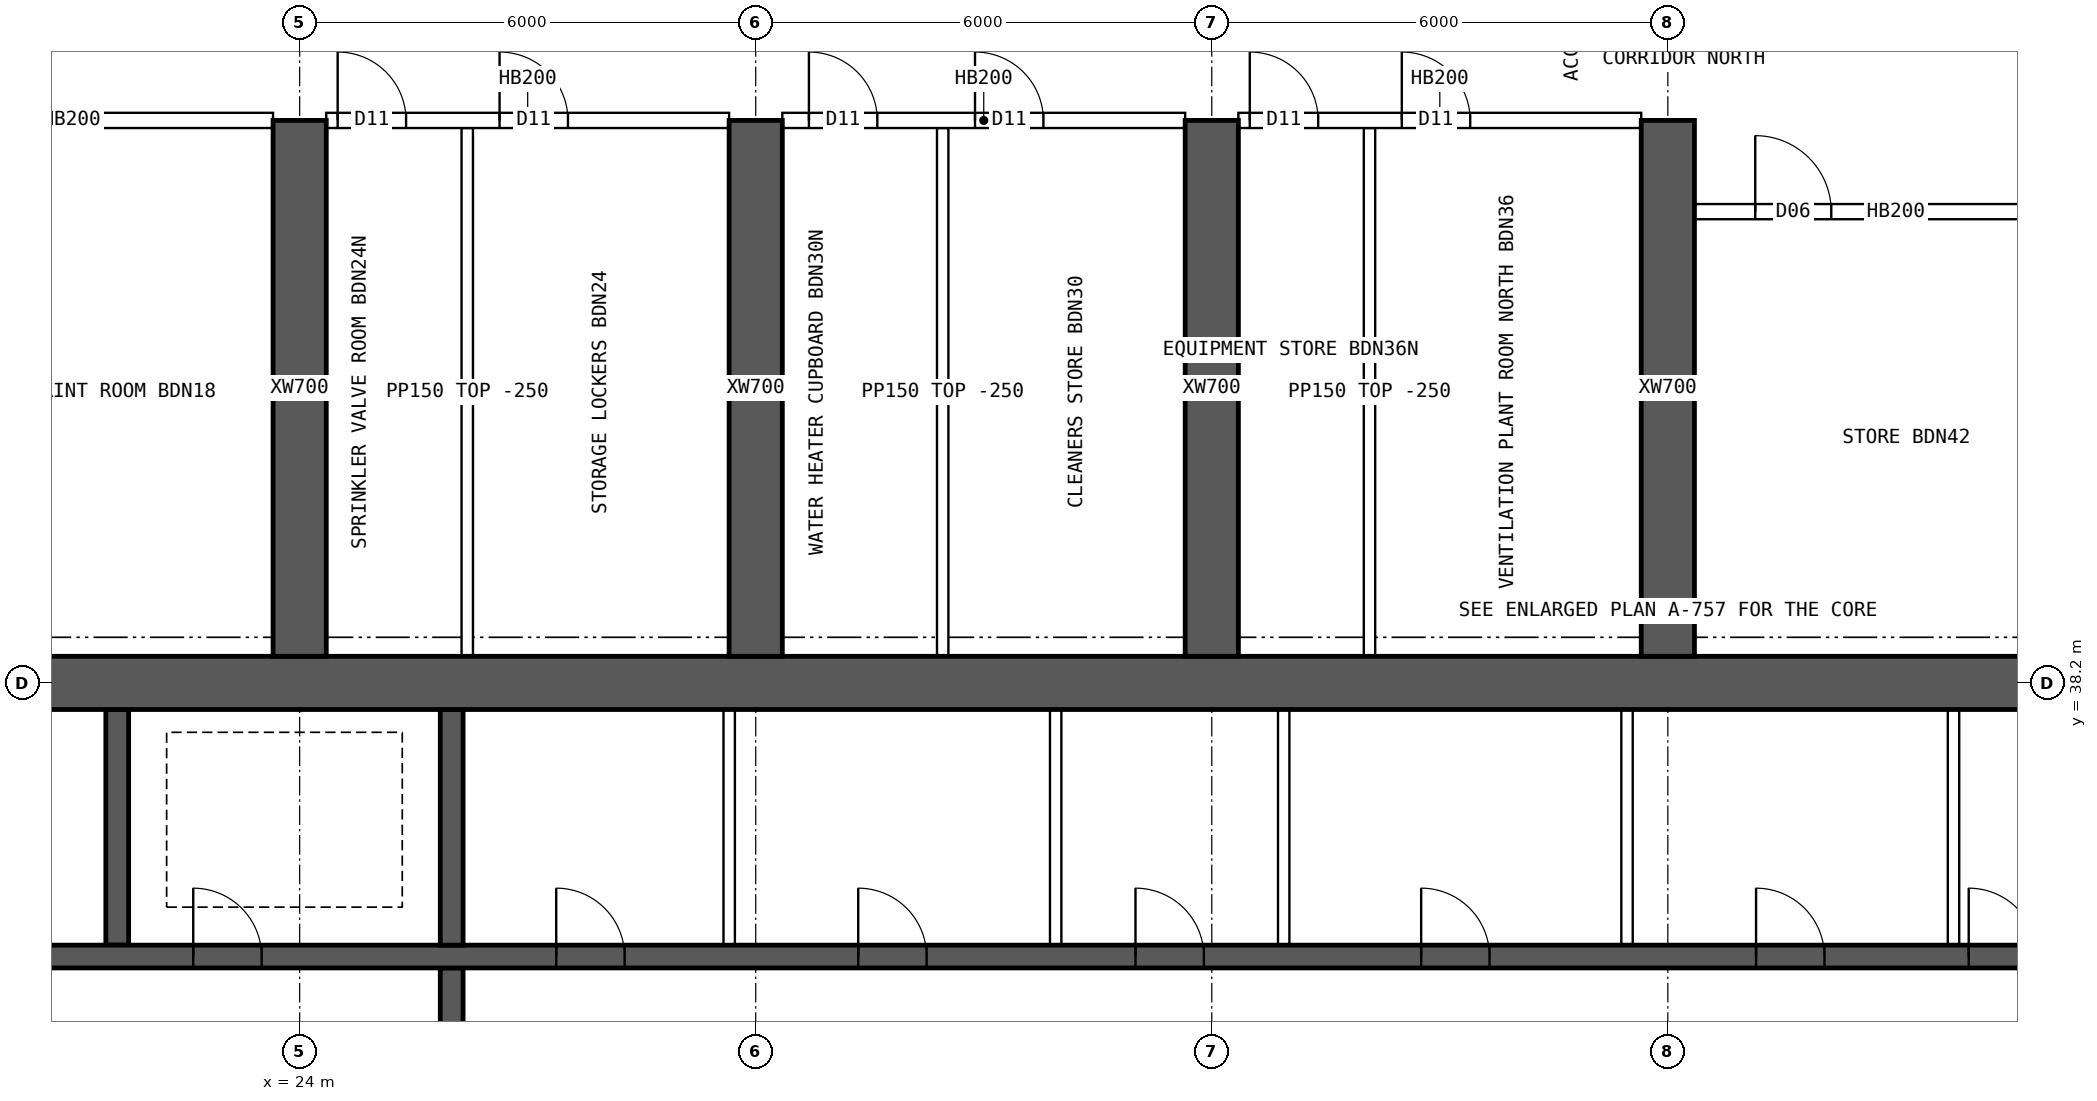
"""IFC4 building model, lengths in metres.
Left out: names, types, materials, properties, quantities, classifications, styles, units other than length and angle.
Written with IfcOpenShell. Run it as: python <this file> out.ifc"""

import sys

from ifc_helpers import new_model, si_unit, direction, frame, frame_2d, origin, place, context, subcontext, project, spatial, rectangle, extrude, element, fill, save


model = new_model("IFC4")
c1 = context("Model", 3, precision=1e-05, world=origin(), true_north=direction((0.0, 1.0)))
c2 = subcontext(c1, "Body", "Model", "MODEL_VIEW")
j1 = project(units=[si_unit("LENGTHUNIT", "METRE"), si_unit("PLANEANGLEUNIT", "RADIAN")], contexts=[c1])
p1 = place(None, origin())
s1 = spatial("IfcSite", under=j1, at=p1, CompositionType="ELEMENT")
p2 = place(p1, origin())
s2 = spatial("IfcBuilding", under=s1, at=p2, CompositionType="ELEMENT")
p3 = place(p2, frame((0.0, 0.0, 220.3)))
s3 = spatial("IfcBuildingStorey", under=s2, at=p3, CompositionType="ELEMENT", Elevation=220.3)
p4 = place(p3, frame((18.0, 38.2, 0.0), z_axis=(0.0, 0.0, 1.0), x_axis=(1.0, 0.0, 0.0)))
e1 = element("IfcWall", 1, at=p4, inside=s3, PredefinedType="SHEAR", context=c2, shape_type="SweptSolid", body=[
    extrude(rectangle(XDim=48.0, YDim=0.7, at=frame_2d((24.0, 0.0))), origin(), (0.0, 0.0, 1.0), 3.75),
])
p5 = place(p3, frame((18.35, 34.6, 0.0), z_axis=(0.0, 0.0, 1.0), x_axis=(1.0, 0.0, 0.0)))
e2 = element("IfcWall", 2, at=p5, inside=s3, PredefinedType="SHEAR", context=c2, shape_type="SweptSolid", body=[
    extrude(rectangle(XDim=47.3, YDim=0.3, at=frame_2d((23.65, 0.0))), origin(), (0.0, 0.0, 1.0), 3.75),
])
p6 = place(p5, frame((0.9, 0.0, 0.0)))
e3 = element("IfcOpeningElement", 3, at=p6, cuts=e2, PredefinedType="OPENING", context=c2, shape_type="SweptSolid", body=[
    extrude(rectangle(XDim=1.1, YDim=2.1, at=frame_2d((0.55, 1.05))), frame((0.0, 0.16, 0.0), z_axis=(0.0, -1.0, 0.0), x_axis=(1.0, 0.0, 0.0)), (0.0, 0.0, 1.0), 0.32),
])
p7 = place(p5, frame((45.3, 0.0, 0.0)))
e4 = element("IfcOpeningElement", 4, at=p7, cuts=e2, PredefinedType="OPENING", context=c2, shape_type="SweptSolid", body=[
    extrude(rectangle(XDim=1.1, YDim=2.1, at=frame_2d((0.55, 1.05))), frame((0.0, 0.16, 0.0), z_axis=(0.0, -1.0, 0.0), x_axis=(1.0, 0.0, 0.0)), (0.0, 0.0, 1.0), 0.32),
])
p8 = place(p5, frame((4.25, 0.0, 0.0)))
e5 = element("IfcOpeningElement", 5, at=p8, cuts=e2, PredefinedType="OPENING", context=c2, shape_type="SweptSolid", body=[
    extrude(rectangle(XDim=0.9, YDim=2.1, at=frame_2d((0.45, 1.05))), frame((0.0, 0.16, 0.0), z_axis=(0.0, -1.0, 0.0), x_axis=(1.0, 0.0, 0.0)), (0.0, 0.0, 1.0), 0.32),
])
p9 = place(p5, frame((42.15, 0.0, 0.0)))
e6 = element("IfcOpeningElement", 6, at=p9, cuts=e2, PredefinedType="OPENING", context=c2, shape_type="SweptSolid", body=[
    extrude(rectangle(XDim=0.9, YDim=2.1, at=frame_2d((0.45, 1.05))), frame((0.0, 0.16, 0.0), z_axis=(0.0, -1.0, 0.0), x_axis=(1.0, 0.0, 0.0)), (0.0, 0.0, 1.0), 0.32),
])
p10 = place(p5, frame((9.025, 0.0, 0.0)))
e7 = element("IfcOpeningElement", 7, at=p10, cuts=e2, PredefinedType="OPENING", context=c2, shape_type="SweptSolid", body=[
    extrude(rectangle(XDim=0.9, YDim=2.1, at=frame_2d((0.45, 1.05))), frame((0.0, 0.16, 0.0), z_axis=(0.0, -1.0, 0.0), x_axis=(1.0, 0.0, 0.0)), (0.0, 0.0, 1.0), 0.32),
])
p11 = place(p5, frame((12.999, 0.0, 0.0)))
e8 = element("IfcOpeningElement", 8, at=p11, cuts=e2, PredefinedType="OPENING", context=c2, shape_type="SweptSolid", body=[
    extrude(rectangle(XDim=0.9, YDim=2.1, at=frame_2d((0.45, 1.05))), frame((0.0, 0.16, 0.0), z_axis=(0.0, -1.0, 0.0), x_axis=(1.0, 0.0, 0.0)), (0.0, 0.0, 1.0), 0.32),
])
p12 = place(p5, frame((16.646, 0.0, 0.0)))
e9 = element("IfcOpeningElement", 9, at=p12, cuts=e2, PredefinedType="OPENING", context=c2, shape_type="SweptSolid", body=[
    extrude(rectangle(XDim=0.9, YDim=2.1, at=frame_2d((0.45, 1.05))), frame((0.0, 0.16, 0.0), z_axis=(0.0, -1.0, 0.0), x_axis=(1.0, 0.0, 0.0)), (0.0, 0.0, 1.0), 0.32),
])
p13 = place(p5, frame((20.405, 0.0, 0.0)))
e10 = element("IfcOpeningElement", 10, at=p13, cuts=e2, PredefinedType="OPENING", context=c2, shape_type="SweptSolid", body=[
    extrude(rectangle(XDim=0.9, YDim=2.1, at=frame_2d((0.45, 1.05))), frame((0.0, 0.16, 0.0), z_axis=(0.0, -1.0, 0.0), x_axis=(1.0, 0.0, 0.0)), (0.0, 0.0, 1.0), 0.32),
])
p14 = place(p5, frame((24.811, 0.0, 0.0)))
e11 = element("IfcOpeningElement", 11, at=p14, cuts=e2, PredefinedType="OPENING", context=c2, shape_type="SweptSolid", body=[
    extrude(rectangle(XDim=0.9, YDim=2.1, at=frame_2d((0.45, 1.05))), frame((0.0, 0.16, 0.0), z_axis=(0.0, -1.0, 0.0), x_axis=(1.0, 0.0, 0.0)), (0.0, 0.0, 1.0), 0.32),
])
p15 = place(p5, frame((27.608, 0.0, 0.0)))
e12 = element("IfcOpeningElement", 12, at=p15, cuts=e2, PredefinedType="OPENING", context=c2, shape_type="SweptSolid", body=[
    extrude(rectangle(XDim=0.9, YDim=2.1, at=frame_2d((0.45, 1.05))), frame((0.0, 0.16, 0.0), z_axis=(0.0, -1.0, 0.0), x_axis=(1.0, 0.0, 0.0)), (0.0, 0.0, 1.0), 0.32),
])
p16 = place(p5, frame((29.575, 0.0, 0.0)))
e13 = element("IfcOpeningElement", 13, at=p16, cuts=e2, PredefinedType="OPENING", context=c2, shape_type="SweptSolid", body=[
    extrude(rectangle(XDim=0.9, YDim=2.1, at=frame_2d((0.45, 1.05))), frame((0.0, 0.16, 0.0), z_axis=(0.0, -1.0, 0.0), x_axis=(1.0, 0.0, 0.0)), (0.0, 0.0, 1.0), 0.32),
])
p17 = place(p5, frame((32.007, 0.0, 0.0)))
e14 = element("IfcOpeningElement", 14, at=p17, cuts=e2, PredefinedType="OPENING", context=c2, shape_type="SweptSolid", body=[
    extrude(rectangle(XDim=0.9, YDim=2.1, at=frame_2d((0.45, 1.05))), frame((0.0, 0.16, 0.0), z_axis=(0.0, -1.0, 0.0), x_axis=(1.0, 0.0, 0.0)), (0.0, 0.0, 1.0), 0.32),
])
p18 = place(p5, frame((34.742, 0.0, 0.0)))
e15 = element("IfcOpeningElement", 15, at=p18, cuts=e2, PredefinedType="OPENING", context=c2, shape_type="SweptSolid", body=[
    extrude(rectangle(XDim=0.9, YDim=2.1, at=frame_2d((0.45, 1.05))), frame((0.0, 0.16, 0.0), z_axis=(0.0, -1.0, 0.0), x_axis=(1.0, 0.0, 0.0)), (0.0, 0.0, 1.0), 0.32),
])
p19 = place(p5, frame((37.781, 0.0, 0.0)))
e16 = element("IfcOpeningElement", 16, at=p19, cuts=e2, PredefinedType="OPENING", context=c2, shape_type="SweptSolid", body=[
    extrude(rectangle(XDim=0.9, YDim=2.1, at=frame_2d((0.45, 1.05))), frame((0.0, 0.16, 0.0), z_axis=(0.0, -1.0, 0.0), x_axis=(1.0, 0.0, 0.0)), (0.0, 0.0, 1.0), 0.32),
])
p20 = place(p3, frame((26.0, 30.55, 0.0), z_axis=(0.0, 0.0, 1.0), x_axis=(0.0, 1.0, 0.0)))
e17 = element("IfcWall", 17, at=p20, inside=s3, PredefinedType="SHEAR", context=c2, shape_type="SweptSolid", body=[
    extrude(rectangle(XDim=3.9, YDim=0.3, at=frame_2d((1.95, 0.0))), origin(), (0.0, 0.0, 1.0), 3.75),
])
p21 = place(p20, frame((1.4, 0.0, 0.0)))
e18 = element("IfcOpeningElement", 18, at=p21, cuts=e17, PredefinedType="OPENING", context=c2, shape_type="SweptSolid", body=[
    extrude(rectangle(XDim=1.2, YDim=2.1, at=frame_2d((0.6, 1.05))), frame((0.0, 0.16, 0.0), z_axis=(0.0, -1.0, 0.0), x_axis=(1.0, 0.0, 0.0)), (0.0, 0.0, 1.0), 0.32),
])
for number, where, z_axis, x_axis in (
    (19, (21.6, 34.75, 0.0), (0.0, 0.0, 1.0), (0.0, 1.0, 0.0)),
    (20, (26.0, 34.75, 0.0), (0.0, 0.0, 1.0), (0.0, 1.0, 0.0)),
):
    element("IfcWall", number, at=place(p3, frame(where, z_axis=z_axis, x_axis=x_axis)), inside=s3, PredefinedType="SHEAR", context=c2, shape_type="SweptSolid", body=[
        extrude(rectangle(XDim=3.1, YDim=0.3, at=frame_2d((1.55, 0.0))), origin(), (0.0, 0.0, 1.0), 3.75),
    ])
for number, where, z_axis, x_axis in (
    (21, (24.0, 38.55, 0.0), (0.0, 0.0, 1.0), (0.0, 1.0, 0.0)),
    (22, (30.0, 38.55, 0.0), (0.0, 0.0, 1.0), (0.0, 1.0, 0.0)),
    (23, (36.0, 38.55, 0.0), (0.0, 0.0, 1.0), (0.0, 1.0, 0.0)),
    (24, (42.0, 38.55, 0.0), (0.0, 0.0, 1.0), (0.0, 1.0, 0.0)),
):
    element("IfcWall", number, at=place(p3, frame(where, z_axis=z_axis, x_axis=x_axis)), inside=s3, PredefinedType="SHEAR", context=c2, shape_type="SweptSolid", body=[
        extrude(rectangle(XDim=7.05, YDim=0.7, at=frame_2d((3.525, 0.0))), origin(), (0.0, 0.0, 1.0), 3.75),
    ])
for number, where, z_axis, x_axis in (
    (25, (29.651, 34.75, 0.0), (0.0, 0.0, 1.0), (0.0, 1.0, 0.0)),
    (26, (33.946, 34.75, 0.0), (0.0, 0.0, 1.0), (0.0, 1.0, 0.0)),
    (27, (36.946, 34.75, 0.0), (0.0, 0.0, 1.0), (0.0, 1.0, 0.0)),
    (28, (41.463, 34.75, 0.0), (0.0, 0.0, 1.0), (0.0, 1.0, 0.0)),
    (29, (45.758, 34.75, 0.0), (0.0, 0.0, 1.0), (0.0, 1.0, 0.0)),
):
    element("IfcWall", number, at=place(p3, frame(where, z_axis=z_axis, x_axis=x_axis)), inside=s3, PredefinedType="SOLIDWALL", context=c2, shape_type="SweptSolid", body=[
        extrude(rectangle(XDim=3.1, YDim=0.15, at=frame_2d((1.55, 0.0))), origin(), (0.0, 0.0, 1.0), 3.5),
    ])
p22 = place(p3, frame((18.35, 45.6, 0.0), z_axis=(0.0, 0.0, 1.0), x_axis=(1.0, 0.0, 0.0)))
e30 = element("IfcWall", 30, at=p22, inside=s3, PredefinedType="SOLIDWALL", context=c2, shape_type="SweptSolid", body=[
    extrude(rectangle(XDim=5.3, YDim=0.2, at=frame_2d((2.65, 0.0))), origin(), (0.0, 0.0, 1.0), 3.5),
])
p23 = place(p22, frame((0.8, 0.0, 0.0)))
e31 = element("IfcOpeningElement", 31, at=p23, cuts=e30, PredefinedType="OPENING", context=c2, shape_type="SweptSolid", body=[
    extrude(rectangle(XDim=1.0, YDim=2.1, at=frame_2d((0.5, 1.05))), frame((0.0, 0.11, 0.0), z_axis=(0.0, -1.0, 0.0), x_axis=(1.0, 0.0, 0.0)), (0.0, 0.0, 1.0), 0.22),
])
p24 = place(p3, frame((24.35, 45.6, 0.0), z_axis=(0.0, 0.0, 1.0), x_axis=(1.0, 0.0, 0.0)))
e32 = element("IfcWall", 32, at=p24, inside=s3, PredefinedType="SOLIDWALL", context=c2, shape_type="SweptSolid", body=[
    extrude(rectangle(XDim=5.3, YDim=0.2, at=frame_2d((2.65, 0.0))), origin(), (0.0, 0.0, 1.0), 3.5),
])
p25 = place(p24, frame((0.15, 0.0, 0.0)))
e33 = element("IfcOpeningElement", 33, at=p25, cuts=e32, PredefinedType="OPENING", context=c2, shape_type="SweptSolid", body=[
    extrude(rectangle(XDim=0.9, YDim=2.1, at=frame_2d((0.45, 1.05))), frame((0.0, 0.11, 0.0), z_axis=(0.0, -1.0, 0.0), x_axis=(1.0, 0.0, 0.0)), (0.0, 0.0, 1.0), 0.22),
])
p26 = place(p24, frame((2.28, 0.0, 0.0)))
e34 = element("IfcOpeningElement", 34, at=p26, cuts=e32, PredefinedType="OPENING", context=c2, shape_type="SweptSolid", body=[
    extrude(rectangle(XDim=0.9, YDim=2.1, at=frame_2d((0.45, 1.05))), frame((0.0, 0.11, 0.0), z_axis=(0.0, -1.0, 0.0), x_axis=(1.0, 0.0, 0.0)), (0.0, 0.0, 1.0), 0.22),
])
p27 = place(p3, frame((30.35, 45.6, 0.0), z_axis=(0.0, 0.0, 1.0), x_axis=(1.0, 0.0, 0.0)))
e35 = element("IfcWall", 35, at=p27, inside=s3, PredefinedType="SOLIDWALL", context=c2, shape_type="SweptSolid", body=[
    extrude(rectangle(XDim=5.3, YDim=0.2, at=frame_2d((2.65, 0.0))), origin(), (0.0, 0.0, 1.0), 3.5),
])
p28 = place(p27, frame((0.35, 0.0, 0.0)))
e36 = element("IfcOpeningElement", 36, at=p28, cuts=e35, PredefinedType="OPENING", context=c2, shape_type="SweptSolid", body=[
    extrude(rectangle(XDim=0.9, YDim=2.1, at=frame_2d((0.45, 1.05))), frame((0.0, 0.11, 0.0), z_axis=(0.0, -1.0, 0.0), x_axis=(1.0, 0.0, 0.0)), (0.0, 0.0, 1.0), 0.22),
])
p29 = place(p27, frame((2.535, 0.0, 0.0)))
e37 = element("IfcOpeningElement", 37, at=p29, cuts=e35, PredefinedType="OPENING", context=c2, shape_type="SweptSolid", body=[
    extrude(rectangle(XDim=0.9, YDim=2.1, at=frame_2d((0.45, 1.05))), frame((0.0, 0.11, 0.0), z_axis=(0.0, -1.0, 0.0), x_axis=(1.0, 0.0, 0.0)), (0.0, 0.0, 1.0), 0.22),
])
p30 = place(p3, frame((36.35, 45.6, 0.0), z_axis=(0.0, 0.0, 1.0), x_axis=(1.0, 0.0, 0.0)))
e38 = element("IfcWall", 38, at=p30, inside=s3, PredefinedType="SOLIDWALL", context=c2, shape_type="SweptSolid", body=[
    extrude(rectangle(XDim=5.3, YDim=0.2, at=frame_2d((2.65, 0.0))), origin(), (0.0, 0.0, 1.0), 3.5),
])
p31 = place(p30, frame((0.15, 0.0, 0.0)))
e39 = element("IfcOpeningElement", 39, at=p31, cuts=e38, PredefinedType="OPENING", context=c2, shape_type="SweptSolid", body=[
    extrude(rectangle(XDim=0.9, YDim=2.1, at=frame_2d((0.45, 1.05))), frame((0.0, 0.11, 0.0), z_axis=(0.0, -1.0, 0.0), x_axis=(1.0, 0.0, 0.0)), (0.0, 0.0, 1.0), 0.22),
])
p32 = place(p30, frame((2.15, 0.0, 0.0)))
e40 = element("IfcOpeningElement", 40, at=p32, cuts=e38, PredefinedType="OPENING", context=c2, shape_type="SweptSolid", body=[
    extrude(rectangle(XDim=0.9, YDim=2.1, at=frame_2d((0.45, 1.05))), frame((0.0, 0.11, 0.0), z_axis=(0.0, -1.0, 0.0), x_axis=(1.0, 0.0, 0.0)), (0.0, 0.0, 1.0), 0.22),
])
for number, where, z_axis, x_axis in (
    (41, (26.205, 38.55, 0.0), (0.0, 0.0, 1.0), (0.0, 1.0, 0.0)),
    (42, (32.46, 38.55, 0.0), (0.0, 0.0, 1.0), (0.0, 1.0, 0.0)),
    (43, (38.075, 38.55, 0.0), (0.0, 0.0, 1.0), (0.0, 1.0, 0.0)),
):
    element("IfcWall", number, at=place(p3, frame(where, z_axis=z_axis, x_axis=x_axis)), inside=s3, PredefinedType="PARTITIONING", context=c2, shape_type="SweptSolid", body=[
        extrude(rectangle(XDim=6.95, YDim=0.15, at=frame_2d((3.475, 0.0))), origin(), (0.0, 0.0, 1.0), 3.5),
    ])
p33 = place(p3, frame((42.35, 44.4, 0.0), z_axis=(0.0, 0.0, 1.0), x_axis=(1.0, 0.0, 0.0)))
e44 = element("IfcWall", 44, at=p33, inside=s3, PredefinedType="SOLIDWALL", context=c2, shape_type="SweptSolid", body=[
    extrude(rectangle(XDim=5.3, YDim=0.2, at=frame_2d((2.65, 0.0))), origin(), (0.0, 0.0, 1.0), 3.5),
])
p34 = place(p33, frame((0.8, 0.0, 0.0)))
e45 = element("IfcOpeningElement", 45, at=p34, cuts=e44, PredefinedType="OPENING", context=c2, shape_type="SweptSolid", body=[
    extrude(rectangle(XDim=1.0, YDim=2.1, at=frame_2d((0.5, 1.05))), frame((0.0, 0.11, 0.0), z_axis=(0.0, -1.0, 0.0), x_axis=(1.0, 0.0, 0.0)), (0.0, 0.0, 1.0), 0.22),
])
p35 = place(p8, origin())
e46 = element("IfcDoor", 46, at=p35, inside=s3, OperationType="SINGLE_SWING_LEFT", PredefinedType="DOOR", context=c2, shape_type="SweptSolid", body=[
    extrude(rectangle(XDim=0.9, YDim=2.1, at=frame_2d((0.45, 1.05))), frame((0.0, 0.025, 0.0), z_axis=(0.0, -1.0, 0.0), x_axis=(1.0, 0.0, 0.0)), (0.0, 0.0, 1.0), 0.05),
])
fill(e5, e46)
p36 = place(p10, origin())
e47 = element("IfcDoor", 47, at=p36, inside=s3, OperationType="SINGLE_SWING_LEFT", PredefinedType="DOOR", context=c2, shape_type="SweptSolid", body=[
    extrude(rectangle(XDim=0.9, YDim=2.1, at=frame_2d((0.45, 1.05))), frame((0.0, 0.025, 0.0), z_axis=(0.0, -1.0, 0.0), x_axis=(1.0, 0.0, 0.0)), (0.0, 0.0, 1.0), 0.05),
])
fill(e7, e47)
p37 = place(p11, origin())
e48 = element("IfcDoor", 48, at=p37, inside=s3, OperationType="SINGLE_SWING_LEFT", PredefinedType="DOOR", context=c2, shape_type="SweptSolid", body=[
    extrude(rectangle(XDim=0.9, YDim=2.1, at=frame_2d((0.45, 1.05))), frame((0.0, 0.025, 0.0), z_axis=(0.0, -1.0, 0.0), x_axis=(1.0, 0.0, 0.0)), (0.0, 0.0, 1.0), 0.05),
])
fill(e8, e48)
p38 = place(p12, origin())
e49 = element("IfcDoor", 49, at=p38, inside=s3, OperationType="SINGLE_SWING_LEFT", PredefinedType="DOOR", context=c2, shape_type="SweptSolid", body=[
    extrude(rectangle(XDim=0.9, YDim=2.1, at=frame_2d((0.45, 1.05))), frame((0.0, 0.025, 0.0), z_axis=(0.0, -1.0, 0.0), x_axis=(1.0, 0.0, 0.0)), (0.0, 0.0, 1.0), 0.05),
])
fill(e9, e49)
p39 = place(p13, origin())
e50 = element("IfcDoor", 50, at=p39, inside=s3, OperationType="SINGLE_SWING_LEFT", PredefinedType="DOOR", context=c2, shape_type="SweptSolid", body=[
    extrude(rectangle(XDim=0.9, YDim=2.1, at=frame_2d((0.45, 1.05))), frame((0.0, 0.025, 0.0), z_axis=(0.0, -1.0, 0.0), x_axis=(1.0, 0.0, 0.0)), (0.0, 0.0, 1.0), 0.05),
])
fill(e10, e50)
p40 = place(p14, origin())
e51 = element("IfcDoor", 51, at=p40, inside=s3, OperationType="SINGLE_SWING_LEFT", PredefinedType="DOOR", context=c2, shape_type="SweptSolid", body=[
    extrude(rectangle(XDim=0.9, YDim=2.1, at=frame_2d((0.45, 1.05))), frame((0.0, 0.025, 0.0), z_axis=(0.0, -1.0, 0.0), x_axis=(1.0, 0.0, 0.0)), (0.0, 0.0, 1.0), 0.05),
])
fill(e11, e51)
p41 = place(p15, origin())
e52 = element("IfcDoor", 52, at=p41, inside=s3, OperationType="SINGLE_SWING_LEFT", PredefinedType="DOOR", context=c2, shape_type="SweptSolid", body=[
    extrude(rectangle(XDim=0.9, YDim=2.1, at=frame_2d((0.45, 1.05))), frame((0.0, 0.025, 0.0), z_axis=(0.0, -1.0, 0.0), x_axis=(1.0, 0.0, 0.0)), (0.0, 0.0, 1.0), 0.05),
])
fill(e12, e52)
p42 = place(p25, origin())
e53 = element("IfcDoor", 53, at=p42, inside=s3, OperationType="SINGLE_SWING_LEFT", PredefinedType="DOOR", context=c2, shape_type="SweptSolid", body=[
    extrude(rectangle(XDim=0.9, YDim=2.1, at=frame_2d((0.45, 1.05))), frame((0.0, 0.025, 0.0), z_axis=(0.0, -1.0, 0.0), x_axis=(1.0, 0.0, 0.0)), (0.0, 0.0, 1.0), 0.05),
])
fill(e33, e53)
p43 = place(p26, origin())
e54 = element("IfcDoor", 54, at=p43, inside=s3, OperationType="SINGLE_SWING_LEFT", PredefinedType="DOOR", context=c2, shape_type="SweptSolid", body=[
    extrude(rectangle(XDim=0.9, YDim=2.1, at=frame_2d((0.45, 1.05))), frame((0.0, 0.025, 0.0), z_axis=(0.0, -1.0, 0.0), x_axis=(1.0, 0.0, 0.0)), (0.0, 0.0, 1.0), 0.05),
])
fill(e34, e54)
p44 = place(p28, origin())
e55 = element("IfcDoor", 55, at=p44, inside=s3, OperationType="SINGLE_SWING_LEFT", PredefinedType="DOOR", context=c2, shape_type="SweptSolid", body=[
    extrude(rectangle(XDim=0.9, YDim=2.1, at=frame_2d((0.45, 1.05))), frame((0.0, 0.025, 0.0), z_axis=(0.0, -1.0, 0.0), x_axis=(1.0, 0.0, 0.0)), (0.0, 0.0, 1.0), 0.05),
])
fill(e36, e55)
p45 = place(p29, origin())
e56 = element("IfcDoor", 56, at=p45, inside=s3, OperationType="SINGLE_SWING_LEFT", PredefinedType="DOOR", context=c2, shape_type="SweptSolid", body=[
    extrude(rectangle(XDim=0.9, YDim=2.1, at=frame_2d((0.45, 1.05))), frame((0.0, 0.025, 0.0), z_axis=(0.0, -1.0, 0.0), x_axis=(1.0, 0.0, 0.0)), (0.0, 0.0, 1.0), 0.05),
])
fill(e37, e56)
p46 = place(p31, origin())
e57 = element("IfcDoor", 57, at=p46, inside=s3, OperationType="SINGLE_SWING_LEFT", PredefinedType="DOOR", context=c2, shape_type="SweptSolid", body=[
    extrude(rectangle(XDim=0.9, YDim=2.1, at=frame_2d((0.45, 1.05))), frame((0.0, 0.025, 0.0), z_axis=(0.0, -1.0, 0.0), x_axis=(1.0, 0.0, 0.0)), (0.0, 0.0, 1.0), 0.05),
])
fill(e39, e57)
p47 = place(p32, origin())
e58 = element("IfcDoor", 58, at=p47, inside=s3, OperationType="SINGLE_SWING_LEFT", PredefinedType="DOOR", context=c2, shape_type="SweptSolid", body=[
    extrude(rectangle(XDim=0.9, YDim=2.1, at=frame_2d((0.45, 1.05))), frame((0.0, 0.025, 0.0), z_axis=(0.0, -1.0, 0.0), x_axis=(1.0, 0.0, 0.0)), (0.0, 0.0, 1.0), 0.05),
])
fill(e40, e58)
p48 = place(p34, origin())
e59 = element("IfcDoor", 59, at=p48, inside=s3, OperationType="SINGLE_SWING_LEFT", PredefinedType="DOOR", context=c2, shape_type="SweptSolid", body=[
    extrude(rectangle(XDim=1.0, YDim=2.1, at=frame_2d((0.5, 1.05))), frame((0.0, 0.025, 0.0), z_axis=(0.0, -1.0, 0.0), x_axis=(1.0, 0.0, 0.0)), (0.0, 0.0, 1.0), 0.05),
])
fill(e45, e59)
save(model, sys.argv[1])
